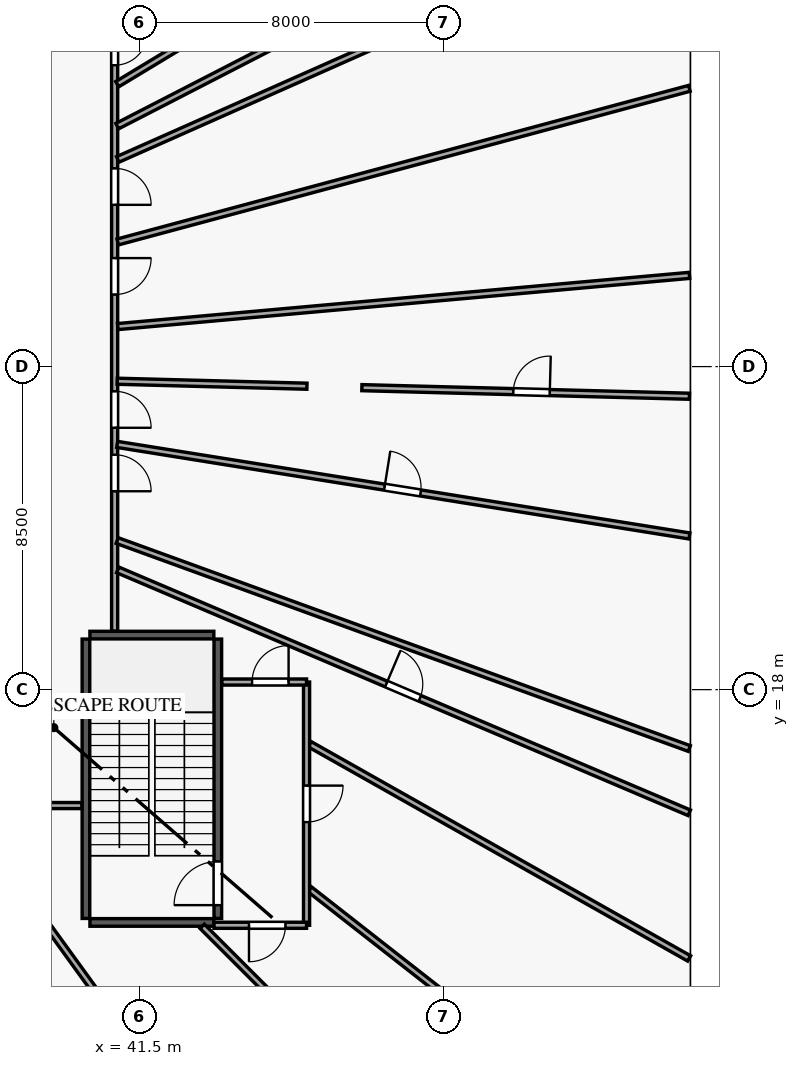
"""IFC4 building model, lengths in metres.
Left out: names, types, materials, properties, quantities, classifications, styles, units other than length and angle.
Written with IfcOpenShell. Run it as: python <this file> out.ifc"""

import sys

from ifc_helpers import new_model, si_unit, direction, frame, frame_2d, origin, origin_with_axes, origin_2d, place, context, subcontext, project, spatial, rectangle, circle, extrude, source, transform, mapped, element, fill, save


model = new_model("IFC4")
c1 = context("Model", 3, precision=1e-05, world=origin(), true_north=direction((0.0, 1.0)))
c2 = subcontext(c1, "Body", "Model", "MODEL_VIEW")
j1 = project(units=[si_unit("LENGTHUNIT", "METRE"), si_unit("PLANEANGLEUNIT", "RADIAN")], contexts=[c1])
p1 = place(None, origin())
s1 = spatial("IfcSite", under=j1, at=p1, CompositionType="ELEMENT")
p2 = place(p1, origin())
s2 = spatial("IfcBuilding", under=s1, at=p2, CompositionType="ELEMENT")
p3 = place(p2, frame((0.0, 0.0, 9.0)))
s3 = spatial("IfcBuildingStorey", under=s2, at=p3, CompositionType="ELEMENT", Elevation=9.0)
m1 = source(origin_with_axes(), c2, "Body", "SweptSolid", [
    extrude(circle(Radius=0.8, at=origin_2d()), origin(), (0.0, 0.0, 1.0), 4.5),
])
p4 = place(p3, frame((46.8, 26.5, 0.0), z_axis=(0.0, 0.0, 1.0), x_axis=(1.0, 0.0, 0.0)))
e1 = element("IfcColumn", 1, at=p4, inside=s3, PredefinedType="COLUMN", context=c2, shape_type="MappedRepresentation", body=[
    mapped(m1, transform((0.0, 0.0, 0.0), scale=1.0)),
])
m2 = source(origin_with_axes(), c2, "Body", "SweptSolid", [
    extrude(rectangle(XDim=0.6, YDim=0.9, at=origin_2d()), origin(), (0.0, 0.0, 1.0), 4.5),
])
for number, where, z_axis, x_axis in (
    (2, (54.8, 10.5, 0.0), (0.0, 0.0, 1.0), (1.0, 0.0, 0.0)),
    (3, (54.8, 18.5, 0.0), (0.0, 0.0, 1.0), (1.0, 0.0, 0.0)),
    (4, (54.8, 34.5, 0.0), (0.0, 0.0, 1.0), (1.0, 0.0, 0.0)),
):
    element("IfcColumn", number, at=place(p3, frame(where, z_axis=z_axis, x_axis=x_axis)), inside=s3, PredefinedType="PILASTER", context=c2, shape_type="MappedRepresentation", body=[
        mapped(m2, transform((0.0, 0.0, 0.0), scale=1.0)),
    ])
p5 = place(p3, frame((40.095, 11.98, 0.0), z_axis=(0.0, 0.0, 1.0), x_axis=(0.0, 1.0, 0.0)))
e5 = element("IfcWall", 5, at=p5, inside=s3, PredefinedType="SHEAR", context=c2, shape_type="SweptSolid", body=[
    extrude(rectangle(XDim=7.35, YDim=0.2, at=frame_2d((3.675, 0.0))), origin(), (0.0, 0.0, 1.0), 4.2),
])
p6 = place(p3, frame((43.565, 11.98, 0.0), z_axis=(0.0, 0.0, 1.0), x_axis=(0.0, 1.0, 0.0)))
e6 = element("IfcWall", 6, at=p6, inside=s3, PredefinedType="SHEAR", context=c2, shape_type="SweptSolid", body=[
    extrude(rectangle(XDim=7.35, YDim=0.2, at=frame_2d((3.675, 0.0))), origin(), (0.0, 0.0, 1.0), 4.2),
])
p7 = place(p6, frame((0.35, 0.0, 0.0)))
e7 = element("IfcOpeningElement", 7, at=p7, cuts=e6, PredefinedType="OPENING", context=c2, shape_type="SweptSolid", body=[
    extrude(rectangle(XDim=1.15, YDim=2.15, at=frame_2d((0.575, 1.075))), frame((0.0, 0.11, 0.0), z_axis=(0.0, -1.0, 0.0), x_axis=(1.0, 0.0, 0.0)), (0.0, 0.0, 1.0), 0.22),
])
for number, where, z_axis, x_axis in (
    (8, (40.2, 11.875, 0.0), (0.0, 0.0, 1.0), (1.0, 0.0, 0.0)),
    (9, (40.2, 19.435, 0.0), (0.0, 0.0, 1.0), (1.0, 0.0, 0.0)),
):
    element("IfcWall", number, at=place(p3, frame(where, z_axis=z_axis, x_axis=x_axis)), inside=s3, PredefinedType="SHEAR", context=c2, shape_type="SweptSolid", body=[
        extrude(rectangle(XDim=3.26, YDim=0.2, at=frame_2d((1.63, 0.0))), origin(), (0.0, 0.0, 1.0), 4.2),
    ])
p8 = place(p3, frame((40.85, 38.05, 0.0), z_axis=(0.0, 0.0, 1.0), x_axis=(0.0, -1.0, 0.0)))
e10 = element("IfcWall", 10, at=p8, inside=s3, PredefinedType="PARTITIONING", context=c2, shape_type="SweptSolid", body=[
    extrude(rectangle(XDim=18.508, YDim=0.16, at=frame_2d((9.254, 0.0))), origin(), (0.0, 0.0, 1.0), 3.25),
])
p9 = place(p8, frame((13.87, 0.0, 0.0)))
e11 = element("IfcOpeningElement", 11, at=p9, cuts=e10, PredefinedType="OPENING", context=c2, shape_type="SweptSolid", body=[
    extrude(rectangle(XDim=0.96, YDim=2.15, at=frame_2d((0.48, 1.075))), frame((0.0, 0.09, 0.0), z_axis=(0.0, -1.0, 0.0), x_axis=(1.0, 0.0, 0.0)), (0.0, 0.0, 1.0), 0.18),
])
p10 = place(p8, frame((8.695, 0.0, 0.0)))
e12 = element("IfcOpeningElement", 12, at=p10, cuts=e10, PredefinedType="OPENING", context=c2, shape_type="SweptSolid", body=[
    extrude(rectangle(XDim=0.96, YDim=2.15, at=frame_2d((0.48, 1.075))), frame((0.0, 0.09, 0.0), z_axis=(0.0, -1.0, 0.0), x_axis=(1.0, 0.0, 0.0)), (0.0, 0.0, 1.0), 0.18),
])
p11 = place(p8, frame((6.334, 0.0, 0.0)))
e13 = element("IfcOpeningElement", 13, at=p11, cuts=e10, PredefinedType="OPENING", context=c2, shape_type="SweptSolid", body=[
    extrude(rectangle(XDim=0.96, YDim=2.15, at=frame_2d((0.48, 1.075))), frame((0.0, 0.09, 0.0), z_axis=(0.0, -1.0, 0.0), x_axis=(1.0, 0.0, 0.0)), (0.0, 0.0, 1.0), 0.18),
])
p12 = place(p8, frame((12.2, 0.0, 0.0)))
e14 = element("IfcOpeningElement", 14, at=p12, cuts=e10, PredefinedType="OPENING", context=c2, shape_type="SweptSolid", body=[
    extrude(rectangle(XDim=0.96, YDim=2.15, at=frame_2d((0.48, 1.075))), frame((0.0, 0.09, 0.0), z_axis=(0.0, -1.0, 0.0), x_axis=(1.0, 0.0, 0.0)), (0.0, 0.0, 1.0), 0.18),
])
p13 = place(p8, frame((2.76, 0.0, 0.0)))
e15 = element("IfcOpeningElement", 15, at=p13, cuts=e10, PredefinedType="OPENING", context=c2, shape_type="SweptSolid", body=[
    extrude(rectangle(XDim=0.86, YDim=2.04, at=frame_2d((0.43, 1.02))), frame((0.0, 0.09, 0.0), z_axis=(0.0, -1.0, 0.0), x_axis=(1.0, 0.0, 0.0)), (0.0, 0.0, 1.0), 0.18),
])
p14 = place(p8, frame((1.494, 0.0, 0.0)))
e16 = element("IfcOpeningElement", 16, at=p14, cuts=e10, PredefinedType="OPENING", context=c2, shape_type="SweptSolid", body=[
    extrude(rectangle(XDim=0.86, YDim=2.04, at=frame_2d((0.43, 1.02))), frame((0.0, 0.09, 0.0), z_axis=(0.0, -1.0, 0.0), x_axis=(1.0, 0.0, 0.0)), (0.0, 0.0, 1.0), 0.18),
])
p15 = place(p3, frame((40.919, 33.932, 0.0), z_axis=(0.0, 0.0, 1.0), x_axis=(0.855961001887, 0.517040388412, 0.0)))
e17 = element("IfcWall", 17, at=p15, inside=s3, PredefinedType="PARTITIONING", context=c2, shape_type="SweptSolid", body=[
    extrude(rectangle(XDim=17.579, YDim=0.16, at=frame_2d((8.789, 0.0))), origin(), (0.0, 0.0, 1.0), 4.2),
])
p16 = place(p15, frame((8.289, 0.0, 0.0)))
e18 = element("IfcOpeningElement", 18, at=p16, cuts=e17, PredefinedType="OPENING", context=c2, shape_type="SweptSolid", body=[
    extrude(rectangle(XDim=0.96, YDim=2.15, at=frame_2d((0.48, 1.075))), frame((0.0, 0.09, 0.0), z_axis=(0.0, -1.0, 0.0), x_axis=(1.0, 0.0, 0.0)), (0.0, 0.0, 1.0), 0.18),
])
p17 = place(p3, frame((40.919, 32.827, 0.0), z_axis=(0.0, 0.0, 1.0), x_axis=(0.8890624387, 0.457785954452, 0.0)))
e19 = element("IfcWall", 19, at=p17, inside=s3, PredefinedType="PARTITIONING", context=c2, shape_type="SweptSolid", body=[
    extrude(rectangle(XDim=16.927, YDim=0.16, at=frame_2d((8.464, 0.0))), origin(), (0.0, 0.0, 1.0), 4.2),
])
p18 = place(p17, frame((8.033, 0.0, 0.0)))
e20 = element("IfcOpeningElement", 20, at=p18, cuts=e19, PredefinedType="OPENING", context=c2, shape_type="SweptSolid", body=[
    extrude(rectangle(XDim=0.86, YDim=2.04, at=frame_2d((0.43, 1.02))), frame((0.0, 0.09, 0.0), z_axis=(0.0, -1.0, 0.0), x_axis=(1.0, 0.0, 0.0)), (0.0, 0.0, 1.0), 0.18),
])
p19 = place(p3, frame((40.932, 31.951, 0.0), z_axis=(0.0, 0.0, 1.0), x_axis=(0.914043329039, 0.405616558636, 0.0)))
e21 = element("IfcWall", 21, at=p19, inside=s3, PredefinedType="PARTITIONING", context=c2, shape_type="SweptSolid", body=[
    extrude(rectangle(XDim=16.452, YDim=0.16, at=frame_2d((8.226, 0.0))), origin(), (0.0, 0.0, 1.0), 4.2),
])
p20 = place(p19, frame((7.733, 0.0, 0.0)))
e22 = element("IfcOpeningElement", 22, at=p20, cuts=e21, PredefinedType="OPENING", context=c2, shape_type="SweptSolid", body=[
    extrude(rectangle(XDim=0.96, YDim=2.15, at=frame_2d((0.48, 1.075))), frame((0.0, 0.09, 0.0), z_axis=(0.0, -1.0, 0.0), x_axis=(1.0, 0.0, 0.0)), (0.0, 0.0, 1.0), 0.18),
])
p21 = place(p3, frame((40.932, 21.151, 0.0), z_axis=(0.0, 0.0, 1.0), x_axis=(0.920324867376, -0.39115487788, 0.0)))
e23 = element("IfcWall", 23, at=p21, inside=s3, PredefinedType="PARTITIONING", context=c2, shape_type="SweptSolid", body=[
    extrude(rectangle(XDim=16.34, YDim=0.16, at=frame_2d((8.17, 0.0))), origin(), (0.0, 0.0, 1.0), 4.2),
])
p22 = place(p21, frame((7.677, 0.0, 0.0)))
e24 = element("IfcOpeningElement", 24, at=p22, cuts=e23, PredefinedType="OPENING", context=c2, shape_type="SweptSolid", body=[
    extrude(rectangle(XDim=0.96, YDim=2.15, at=frame_2d((0.48, 1.075))), frame((0.0, 0.09, 0.0), z_axis=(0.0, -1.0, 0.0), x_axis=(1.0, 0.0, 0.0)), (0.0, 0.0, 1.0), 0.18),
])
p23 = place(p3, frame((40.918, 21.922, 0.0), z_axis=(0.0, 0.0, 1.0), x_axis=(0.93983791992, -0.341620673088, 0.0)))
e25 = element("IfcWall", 25, at=p23, inside=s3, PredefinedType="PARTITIONING", context=c2, shape_type="SweptSolid", body=[
    extrude(rectangle(XDim=16.017, YDim=0.16, at=frame_2d((8.008, 0.0))), origin(), (0.0, 0.0, 1.0), 4.2),
])
p24 = place(p3, frame((40.932, 29.779, 0.0), z_axis=(0.0, 0.0, 1.0), x_axis=(0.96572887565, 0.259552959405, 0.0)))
e26 = element("IfcWall", 26, at=p24, inside=s3, PredefinedType="PARTITIONING", context=c2, shape_type="SweptSolid", body=[
    extrude(rectangle(XDim=15.575, YDim=0.16, at=frame_2d((7.787, 0.0))), origin(), (0.0, 0.0, 1.0), 3.7),
])
p25 = place(p3, frame((40.917, 24.453, 0.0), z_axis=(0.0, 0.0, 1.0), x_axis=(0.987442330367, -0.157979885424, 0.0)))
e27 = element("IfcWall", 27, at=p25, inside=s3, PredefinedType="PARTITIONING", context=c2, shape_type="SweptSolid", body=[
    extrude(rectangle(XDim=15.248, YDim=0.16, at=frame_2d((7.624, 0.0))), origin(), (0.0, 0.0, 1.0), 3.7),
])
p26 = place(p25, frame((7.124, 0.0, 0.0)))
e28 = element("IfcOpeningElement", 28, at=p26, cuts=e27, PredefinedType="OPENING", context=c2, shape_type="SweptSolid", body=[
    extrude(rectangle(XDim=0.96, YDim=2.15, at=frame_2d((0.48, 1.075))), frame((0.0, 0.09, 0.0), z_axis=(0.0, -1.0, 0.0), x_axis=(1.0, 0.0, 0.0)), (0.0, 0.0, 1.0), 0.18),
])
p27 = place(p3, frame((40.932, 27.553, 0.0), z_axis=(0.0, 0.0, 1.0), x_axis=(0.996013941628, 0.08919769102, 0.0)))
e29 = element("IfcWall", 29, at=p27, inside=s3, PredefinedType="PARTITIONING", context=c2, shape_type="SweptSolid", body=[
    extrude(rectangle(XDim=15.103, YDim=0.16, at=frame_2d((7.552, 0.0))), origin(), (0.0, 0.0, 1.0), 3.7),
])
p28 = place(p3, frame((39.988, 14.95, 0.0), z_axis=(0.0, 0.0, 1.0), x_axis=(-1.0, 0.0, 0.0)))
e30 = element("IfcWall", 30, at=p28, inside=s3, PredefinedType="PARTITIONING", context=c2, shape_type="SweptSolid", body=[
    extrude(rectangle(XDim=14.588, YDim=0.16, at=frame_2d((7.294, 0.0))), origin(), (0.0, 0.0, 1.0), 4.2),
])
p29 = place(p28, frame((10.34, 0.0, 0.0)))
e31 = element("IfcOpeningElement", 31, at=p29, cuts=e30, PredefinedType="OPENING", context=c2, shape_type="SweptSolid", body=[
    extrude(rectangle(XDim=0.96, YDim=2.15, at=frame_2d((0.48, 1.075))), frame((0.0, 0.09, 0.0), z_axis=(0.0, -1.0, 0.0), x_axis=(1.0, 0.0, 0.0)), (0.0, 0.0, 1.0), 0.18),
])
p30 = place(p28, frame((7.608, 0.0, 0.0)))
e32 = element("IfcOpeningElement", 32, at=p30, cuts=e30, PredefinedType="OPENING", context=c2, shape_type="SweptSolid", body=[
    extrude(rectangle(XDim=0.96, YDim=2.15, at=frame_2d((0.48, 1.075))), frame((0.0, 0.09, 0.0), z_axis=(0.0, -1.0, 0.0), x_axis=(1.0, 0.0, 0.0)), (0.0, 0.0, 1.0), 0.18),
])
p31 = place(p28, frame((5.545, 0.0, 0.0)))
e33 = element("IfcOpeningElement", 33, at=p31, cuts=e30, PredefinedType="OPENING", context=c2, shape_type="SweptSolid", body=[
    extrude(rectangle(XDim=0.96, YDim=2.15, at=frame_2d((0.48, 1.075))), frame((0.0, 0.09, 0.0), z_axis=(0.0, -1.0, 0.0), x_axis=(1.0, 0.0, 0.0)), (0.0, 0.0, 1.0), 0.18),
])
p32 = place(p28, frame((3.582, 0.0, 0.0)))
e34 = element("IfcOpeningElement", 34, at=p32, cuts=e30, PredefinedType="OPENING", context=c2, shape_type="SweptSolid", body=[
    extrude(rectangle(XDim=0.96, YDim=2.15, at=frame_2d((0.48, 1.075))), frame((0.0, 0.09, 0.0), z_axis=(0.0, -1.0, 0.0), x_axis=(1.0, 0.0, 0.0)), (0.0, 0.0, 1.0), 0.18),
])
p33 = place(p28, frame((1.54, 0.0, 0.0)))
e35 = element("IfcOpeningElement", 35, at=p33, cuts=e30, PredefinedType="OPENING", context=c2, shape_type="SweptSolid", body=[
    extrude(rectangle(XDim=0.96, YDim=2.15, at=frame_2d((0.48, 1.075))), frame((0.0, 0.09, 0.0), z_axis=(0.0, -1.0, 0.0), x_axis=(1.0, 0.0, 0.0)), (0.0, 0.0, 1.0), 0.18),
])
p34 = place(p3, frame((36.856, 14.868, 0.0), z_axis=(0.0, 0.0, 1.0), x_axis=(0.586848404005, -0.809696826422, 0.0)))
e36 = element("IfcWall", 36, at=p34, inside=s3, PredefinedType="PARTITIONING", context=c2, shape_type="SweptSolid", body=[
    extrude(rectangle(XDim=14.302, YDim=0.16, at=frame_2d((7.151, 0.0))), origin(), (0.0, 0.0, 1.0), 4.2),
])
p35 = place(p34, frame((6.659, 0.0, 0.0)))
e37 = element("IfcOpeningElement", 37, at=p35, cuts=e36, PredefinedType="OPENING", context=c2, shape_type="SweptSolid", body=[
    extrude(rectangle(XDim=0.96, YDim=2.15, at=frame_2d((0.48, 1.075))), frame((0.0, 0.09, 0.0), z_axis=(0.0, -1.0, 0.0), x_axis=(1.0, 0.0, 0.0)), (0.0, 0.0, 1.0), 0.18),
])
p36 = place(p3, frame((34.991, 14.868, 0.0), z_axis=(0.0, 0.0, 1.0), x_axis=(0.491242274215, -0.871022977897, 0.0)))
e38 = element("IfcWall", 38, at=p36, inside=s3, PredefinedType="PARTITIONING", context=c2, shape_type="SweptSolid", body=[
    extrude(rectangle(XDim=13.3, YDim=0.16, at=frame_2d((6.65, 0.0))), origin(), (0.0, 0.0, 1.0), 4.2),
])
p37 = place(p3, frame((45.982, 12.746, 0.0), z_axis=(0.0, 0.0, 1.0), x_axis=(0.787599730353, -0.616187199436, 0.0)))
e39 = element("IfcWall", 39, at=p37, inside=s3, PredefinedType="PARTITIONING", context=c2, shape_type="SweptSolid", body=[
    extrude(rectangle(XDim=12.67, YDim=0.16, at=frame_2d((6.335, 0.0))), origin(), (0.0, 0.0, 1.0), 4.2),
])
p38 = place(p3, frame((45.982, 16.563, 0.0), z_axis=(0.0, 0.0, 1.0), x_axis=(0.870851801876, -0.491545663362, 0.0)))
e40 = element("IfcWall", 40, at=p38, inside=s3, PredefinedType="PARTITIONING", context=c2, shape_type="SweptSolid", body=[
    extrude(rectangle(XDim=11.465, YDim=0.16, at=frame_2d((5.733, 0.0))), origin(), (0.0, 0.0, 1.0), 4.2),
])
p39 = place(p3, frame((47.356, 25.946, 0.0), z_axis=(0.0, 0.0, 1.0), x_axis=(0.999656949927, -0.026191266922, 0.0)))
e41 = element("IfcWall", 41, at=p39, inside=s3, PredefinedType="PARTITIONING", context=c2, shape_type="SweptSolid", body=[
    extrude(rectangle(XDim=8.622, YDim=0.16, at=frame_2d((4.311, 0.0))), origin(), (0.0, 0.0, 1.0), 3.7),
])
p40 = place(p39, frame((3.986, 0.0, 0.0)))
e42 = element("IfcOpeningElement", 42, at=p40, cuts=e41, PredefinedType="OPENING", context=c2, shape_type="SweptSolid", body=[
    extrude(rectangle(XDim=0.96, YDim=2.15, at=frame_2d((0.48, 1.075))), frame((0.0, 0.09, 0.0), z_axis=(0.0, -1.0, 0.0), x_axis=(1.0, 0.0, 0.0)), (0.0, 0.0, 1.0), 0.18),
])
p41 = place(p3, frame((45.9, 18.2, 0.0), z_axis=(0.0, 0.0, 1.0), x_axis=(0.0, -1.0, 0.0)))
e43 = element("IfcWall", 43, at=p41, inside=s3, PredefinedType="PARTITIONING", context=c2, shape_type="SweptSolid", body=[
    extrude(rectangle(XDim=6.4, YDim=0.16, at=frame_2d((3.2, 0.0))), origin(), (0.0, 0.0, 1.0), 4.2),
])
p42 = place(p41, frame((2.725, 0.0, 0.0)))
e44 = element("IfcOpeningElement", 44, at=p42, cuts=e43, PredefinedType="OPENING", context=c2, shape_type="SweptSolid", body=[
    extrude(rectangle(XDim=0.96, YDim=2.15, at=frame_2d((0.48, 1.075))), frame((0.0, 0.09, 0.0), z_axis=(0.0, -1.0, 0.0), x_axis=(1.0, 0.0, 0.0)), (0.0, 0.0, 1.0), 0.18),
])
p43 = place(p3, frame((40.917, 26.115, 0.0), z_axis=(0.0, 0.0, 1.0), x_axis=(0.999656721333, -0.026199990349, 0.0)))
e45 = element("IfcWall", 45, at=p43, inside=s3, PredefinedType="PARTITIONING", context=c2, shape_type="SweptSolid", body=[
    extrude(rectangle(XDim=4.995, YDim=0.16, at=frame_2d((2.497, 0.0))), origin(), (0.0, 0.0, 1.0), 3.25),
])
p44 = place(p3, frame((43.153, 11.773, 0.0), z_axis=(0.0, 0.0, 1.0), x_axis=(0.707361787394, -0.706851682982, 0.0)))
e46 = element("IfcWall", 46, at=p44, inside=s3, PredefinedType="PARTITIONING", context=c2, shape_type="SweptSolid", body=[
    extrude(rectangle(XDim=4.786, YDim=0.16, at=frame_2d((2.393, 0.0))), origin(), (0.0, 0.0, 1.0), 3.25),
])
p45 = place(p3, frame((45.9, 11.8, 0.0), z_axis=(0.0, 0.0, 1.0), x_axis=(-1.0, 0.0, 0.0)))
e47 = element("IfcWall", 47, at=p45, inside=s3, PredefinedType="PARTITIONING", context=c2, shape_type="SweptSolid", body=[
    extrude(rectangle(XDim=2.435, YDim=0.16, at=frame_2d((1.217, 0.0))), origin(), (0.0, 0.0, 1.0), 4.2),
])
p46 = place(p45, frame((0.555, 0.0, 0.0)))
e48 = element("IfcOpeningElement", 48, at=p46, cuts=e47, PredefinedType="OPENING", context=c2, shape_type="SweptSolid", body=[
    extrude(rectangle(XDim=0.96, YDim=2.15, at=frame_2d((0.48, 1.075))), frame((0.0, 0.09, 0.0), z_axis=(0.0, -1.0, 0.0), x_axis=(1.0, 0.0, 0.0)), (0.0, 0.0, 1.0), 0.18),
])
p47 = place(p3, frame((43.672, 18.2, 0.0), z_axis=(0.0, 0.0, 1.0), x_axis=(1.0, 0.0, 0.0)))
e49 = element("IfcWall", 49, at=p47, inside=s3, PredefinedType="PARTITIONING", context=c2, shape_type="SweptSolid", body=[
    extrude(rectangle(XDim=2.228, YDim=0.16, at=frame_2d((1.114, 0.0))), origin(), (0.0, 0.0, 1.0), 4.2),
])
p48 = place(p47, frame((0.795, 0.0, 0.0)))
e50 = element("IfcOpeningElement", 50, at=p48, cuts=e49, PredefinedType="OPENING", context=c2, shape_type="SweptSolid", body=[
    extrude(rectangle(XDim=0.96, YDim=2.15, at=frame_2d((0.48, 1.075))), frame((0.0, 0.09, 0.0), z_axis=(0.0, -1.0, 0.0), x_axis=(1.0, 0.0, 0.0)), (0.0, 0.0, 1.0), 0.18),
])
m3 = source(origin_with_axes(), c2, "Body", "SweptSolid", [
    extrude(rectangle(XDim=1.15, YDim=2.15, at=frame_2d((0.575, 1.075))), frame((0.0, 0.025, 0.0), z_axis=(0.0, -1.0, 0.0), x_axis=(1.0, 0.0, 0.0)), (0.0, 0.0, 1.0), 0.05),
])
p49 = place(p7, origin())
e51 = element("IfcDoor", 51, at=p49, inside=s3, OperationType="SINGLE_SWING_LEFT", PredefinedType="DOOR", context=c2, shape_type="MappedRepresentation", body=[
    mapped(m3, transform((0.0, 0.0, 0.0), scale=1.0)),
])
fill(e7, e51)
m4 = source(origin_with_axes(), c2, "Body", "SweptSolid", [
    extrude(rectangle(XDim=0.96, YDim=2.15, at=frame_2d((0.48, 1.075))), frame((0.0, 0.025, 0.0), z_axis=(0.0, -1.0, 0.0), x_axis=(1.0, 0.0, 0.0)), (0.0, 0.0, 1.0), 0.05),
])
p50 = place(p46, origin())
e52 = element("IfcDoor", 52, at=p50, inside=s3, OperationType="SINGLE_SWING_RIGHT", PredefinedType="DOOR", context=c2, shape_type="MappedRepresentation", body=[
    mapped(m4, transform((0.0, 0.0, 0.0), scale=1.0)),
])
fill(e48, e52)
p51 = place(p42, origin())
e53 = element("IfcDoor", 53, at=p51, inside=s3, OperationType="SINGLE_SWING_LEFT", PredefinedType="DOOR", context=c2, shape_type="MappedRepresentation", body=[
    mapped(m4, transform((0.0, 0.0, 0.0), scale=1.0)),
])
fill(e44, e53)
p52 = place(p48, origin())
e54 = element("IfcDoor", 54, at=p52, inside=s3, OperationType="SINGLE_SWING_RIGHT", PredefinedType="DOOR", context=c2, shape_type="MappedRepresentation", body=[
    mapped(m4, transform((0.0, 0.0, 0.0), scale=1.0)),
])
fill(e50, e54)
p53 = place(p22, origin())
e55 = element("IfcDoor", 55, at=p53, inside=s3, OperationType="SINGLE_SWING_LEFT", PredefinedType="DOOR", context=c2, shape_type="MappedRepresentation", body=[
    mapped(m4, transform((0.0, 0.0, 0.0), scale=1.0)),
])
fill(e24, e55)
p54 = place(p9, origin())
e56 = element("IfcDoor", 56, at=p54, inside=s3, OperationType="SINGLE_SWING_RIGHT", PredefinedType="DOOR", context=c2, shape_type="MappedRepresentation", body=[
    mapped(m4, transform((0.0, 0.0, 0.0), scale=1.0)),
])
fill(e11, e56)
p55 = place(p26, origin())
e57 = element("IfcDoor", 57, at=p55, inside=s3, OperationType="SINGLE_SWING_LEFT", PredefinedType="DOOR", context=c2, shape_type="MappedRepresentation", body=[
    mapped(m4, transform((0.0, 0.0, 0.0), scale=1.0)),
])
fill(e28, e57)
p56 = place(p40, origin())
e58 = element("IfcDoor", 58, at=p56, inside=s3, OperationType="SINGLE_SWING_RIGHT", PredefinedType="DOOR", context=c2, shape_type="MappedRepresentation", body=[
    mapped(m4, transform((0.0, 0.0, 0.0), scale=1.0)),
])
fill(e42, e58)
p57 = place(p10, origin())
e59 = element("IfcDoor", 59, at=p57, inside=s3, OperationType="SINGLE_SWING_LEFT", PredefinedType="DOOR", context=c2, shape_type="MappedRepresentation", body=[
    mapped(m4, transform((0.0, 0.0, 0.0), scale=1.0)),
])
fill(e12, e59)
p58 = place(p11, origin())
e60 = element("IfcDoor", 60, at=p58, inside=s3, OperationType="SINGLE_SWING_RIGHT", PredefinedType="DOOR", context=c2, shape_type="MappedRepresentation", body=[
    mapped(m4, transform((0.0, 0.0, 0.0), scale=1.0)),
])
fill(e13, e60)
p59 = place(p12, origin())
e61 = element("IfcDoor", 61, at=p59, inside=s3, OperationType="SINGLE_SWING_RIGHT", PredefinedType="DOOR", context=c2, shape_type="MappedRepresentation", body=[
    mapped(m4, transform((0.0, 0.0, 0.0), scale=1.0)),
])
fill(e14, e61)
m5 = source(origin_with_axes(), c2, "Body", "SweptSolid", [
    extrude(rectangle(XDim=0.86, YDim=2.04, at=frame_2d((0.43, 1.02))), frame((0.0, 0.025, 0.0), z_axis=(0.0, -1.0, 0.0), x_axis=(1.0, 0.0, 0.0)), (0.0, 0.0, 1.0), 0.05),
])
p60 = place(p13, origin())
e62 = element("IfcDoor", 62, at=p60, inside=s3, OperationType="SINGLE_SWING_LEFT", PredefinedType="DOOR", context=c2, shape_type="MappedRepresentation", body=[
    mapped(m5, transform((0.0, 0.0, 0.0), scale=1.0)),
])
fill(e15, e62)
save(model, sys.argv[1])
